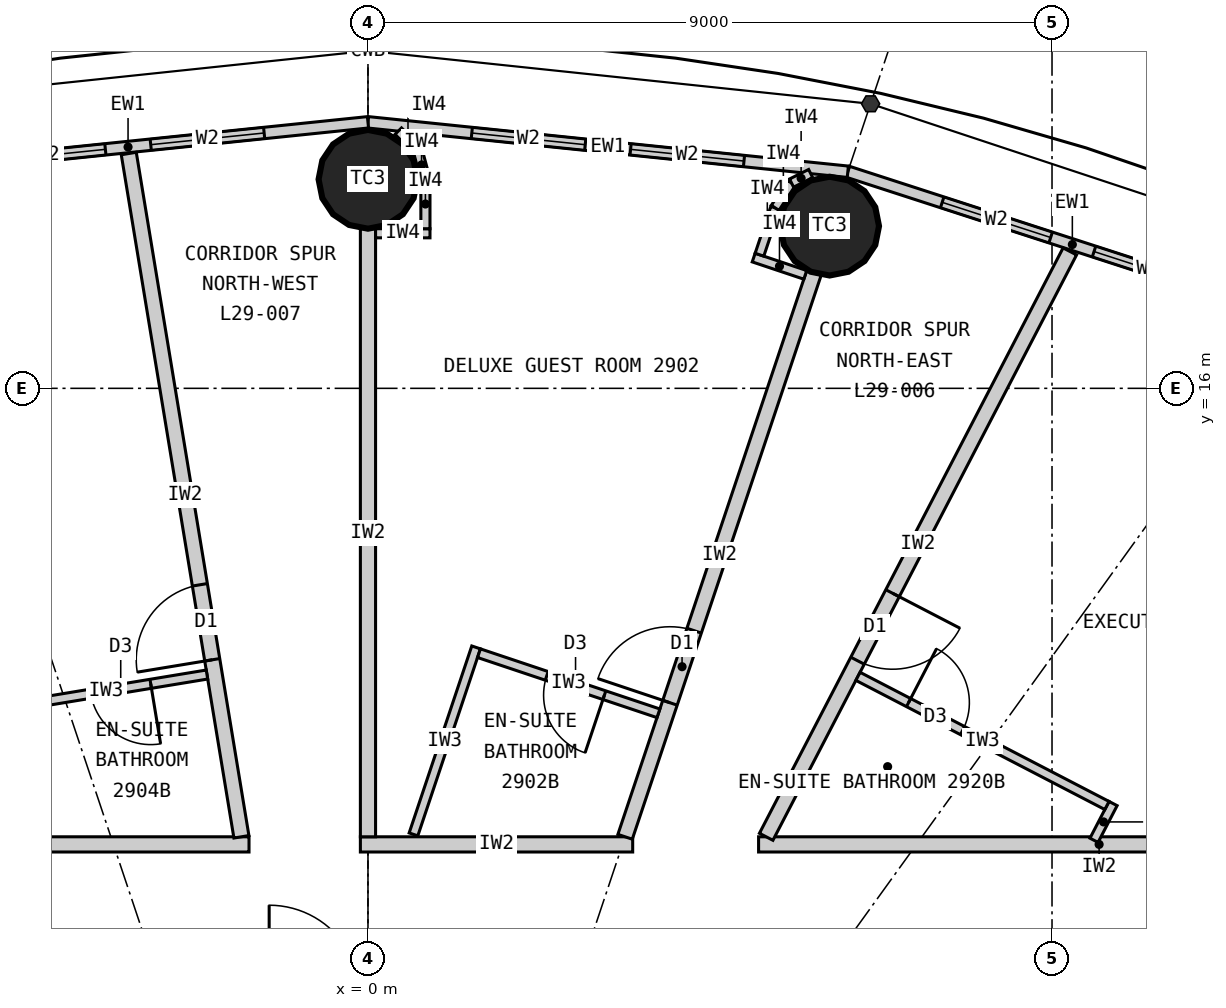
"""IFC4 building model, lengths in metres.
Left out: names, types, materials, properties, quantities, classifications, styles, units other than length and angle.
Written with IfcOpenShell. Run it as: python <this file> out.ifc"""

import sys

from ifc_helpers import new_model, si_unit, direction, frame, frame_2d, origin, origin_2d, place, context, subcontext, project, spatial, rectangle, circle, extrude, element, fill, save


model = new_model("IFC4")
c1 = context("Model", 3, precision=1e-05, world=origin(), true_north=direction((0.0, 1.0)))
c2 = subcontext(c1, "Body", "Model", "MODEL_VIEW")
j1 = project(units=[si_unit("LENGTHUNIT", "METRE"), si_unit("PLANEANGLEUNIT", "RADIAN")], contexts=[c1])
p1 = place(None, origin())
s1 = spatial("IfcSite", under=j1, at=p1, CompositionType="ELEMENT")
p2 = place(p1, origin())
s2 = spatial("IfcBuilding", under=s1, at=p2, CompositionType="ELEMENT")
p3 = place(p2, frame((0.0, 0.0, 115.5)))
s3 = spatial("IfcBuildingStorey", under=s2, at=p3, CompositionType="ELEMENT", Elevation=115.5)
for number, where, z_axis, x_axis in (
    (1, (6.074, 18.135, 0.0), (0.0, 0.0, 1.0), (1.0, 0.0, 0.0)),
    (2, (0.0, 18.75, 0.0), (0.0, 0.0, 1.0), (1.0, 0.0, 0.0)),
):
    element("IfcColumn", number, at=place(p3, frame(where, z_axis=z_axis, x_axis=x_axis)), inside=s3, PredefinedType="COLUMN", context=c2, shape_type="SweptSolid", body=[
        extrude(circle(Radius=0.65, at=origin_2d()), origin(), (0.0, 0.0, 1.0), 3.3),
    ])
p4 = place(p3, frame((12.221, 16.935, 0.0), z_axis=(0.0, 0.0, 1.0), x_axis=(-0.951272691506, 0.308350881944, 0.0)))
e3 = element("IfcWall", 3, at=p4, inside=s3, PredefinedType="ELEMENTEDWALL", context=c2, shape_type="SweptSolid", body=[
    extrude(rectangle(XDim=6.211, YDim=0.15, at=frame_2d((3.105, 0.0))), origin(), (0.0, 0.0, 1.0), 3.12),
])
p5 = place(p4, frame((1.305, 0.0, 0.9)))
e4 = element("IfcOpeningElement", 4, at=p5, cuts=e3, PredefinedType="OPENING", context=c2, shape_type="SweptSolid", body=[
    extrude(rectangle(XDim=1.5, YDim=1.9, at=frame_2d((0.75, 0.95))), frame((0.0, 0.085, 0.0), z_axis=(0.0, -1.0, 0.0), x_axis=(1.0, 0.0, 0.0)), (0.0, 0.0, 1.0), 0.17),
])
p6 = place(p4, frame((3.405, 0.0, 0.9)))
e5 = element("IfcOpeningElement", 5, at=p6, cuts=e3, PredefinedType="OPENING", context=c2, shape_type="SweptSolid", body=[
    extrude(rectangle(XDim=1.5, YDim=1.9, at=frame_2d((0.75, 0.95))), frame((0.0, 0.085, 0.0), z_axis=(0.0, -1.0, 0.0), x_axis=(1.0, 0.0, 0.0)), (0.0, 0.0, 1.0), 0.17),
])
p7 = place(p3, frame((6.313, 18.85, 0.0), z_axis=(0.0, 0.0, 1.0), x_axis=(-0.994735690163, 0.102473931887, 0.0)))
e6 = element("IfcWall", 6, at=p7, inside=s3, PredefinedType="ELEMENTEDWALL", context=c2, shape_type="SweptSolid", body=[
    extrude(rectangle(XDim=6.347, YDim=0.15, at=frame_2d((3.173, 0.0))), origin(), (0.0, 0.0, 1.0), 3.12),
])
p8 = place(p7, frame((1.373, 0.0, 0.9)))
e7 = element("IfcOpeningElement", 7, at=p8, cuts=e6, PredefinedType="OPENING", context=c2, shape_type="SweptSolid", body=[
    extrude(rectangle(XDim=1.5, YDim=1.9, at=frame_2d((0.75, 0.95))), frame((0.0, 0.085, 0.0), z_axis=(0.0, -1.0, 0.0), x_axis=(1.0, 0.0, 0.0)), (0.0, 0.0, 1.0), 0.17),
])
p9 = place(p7, frame((3.473, 0.0, 0.9)))
e8 = element("IfcOpeningElement", 8, at=p9, cuts=e6, PredefinedType="OPENING", context=c2, shape_type="SweptSolid", body=[
    extrude(rectangle(XDim=1.5, YDim=1.9, at=frame_2d((0.75, 0.95))), frame((0.0, 0.085, 0.0), z_axis=(0.0, -1.0, 0.0), x_axis=(1.0, 0.0, 0.0)), (0.0, 0.0, 1.0), 0.17),
])
p10 = place(p3, frame((0.0, 19.5, 0.0), z_axis=(0.0, 0.0, 1.0), x_axis=(-0.994735690163, -0.102473931887, 0.0)))
e9 = element("IfcWall", 9, at=p10, inside=s3, PredefinedType="ELEMENTEDWALL", context=c2, shape_type="SweptSolid", body=[
    extrude(rectangle(XDim=6.347, YDim=0.15, at=frame_2d((3.173, 0.0))), origin(), (0.0, 0.0, 1.0), 3.12),
])
p11 = place(p10, frame((1.373, 0.0, 0.9)))
e10 = element("IfcOpeningElement", 10, at=p11, cuts=e9, PredefinedType="OPENING", context=c2, shape_type="SweptSolid", body=[
    extrude(rectangle(XDim=1.5, YDim=1.9, at=frame_2d((0.75, 0.95))), frame((0.0, 0.085, 0.0), z_axis=(0.0, -1.0, 0.0), x_axis=(1.0, 0.0, 0.0)), (0.0, 0.0, 1.0), 0.17),
])
p12 = place(p10, frame((3.473, 0.0, 0.9)))
e11 = element("IfcOpeningElement", 11, at=p12, cuts=e9, PredefinedType="OPENING", context=c2, shape_type="SweptSolid", body=[
    extrude(rectangle(XDim=1.5, YDim=1.9, at=frame_2d((0.75, 0.95))), frame((0.0, 0.085, 0.0), z_axis=(0.0, -1.0, 0.0), x_axis=(1.0, 0.0, 0.0)), (0.0, 0.0, 1.0), 0.17),
])
p13 = place(p3, frame((-14.1, 10.0, 0.0), z_axis=(0.0, 0.0, 1.0), x_axis=(1.0, 0.0, 0.0)))
e12 = element("IfcWall", 12, at=p13, inside=s3, PredefinedType="PARTITIONING", context=c2, shape_type="SweptSolid", body=[
    extrude(rectangle(XDim=12.535, YDim=0.2, at=frame_2d((6.268, 0.0))), origin(), (0.0, 0.0, 1.0), 3.12),
])
p14 = place(p13, frame((2.801, 0.0, 0.0)))
e13 = element("IfcOpeningElement", 13, at=p14, cuts=e12, PredefinedType="OPENING", context=c2, shape_type="SweptSolid", body=[
    extrude(rectangle(XDim=1.0, YDim=2.2, at=frame_2d((0.5, 1.1))), frame((0.0, 0.11, 0.0), z_axis=(0.0, -1.0, 0.0), x_axis=(1.0, 0.0, 0.0)), (0.0, 0.0, 1.0), 0.22),
])
p15 = place(p3, frame((-0.1, 10.0, 0.0), z_axis=(0.0, 0.0, 1.0), x_axis=(1.0, 0.0, 0.0)))
e14 = element("IfcWall", 14, at=p15, inside=s3, PredefinedType="PARTITIONING", context=c2, shape_type="SweptSolid", body=[
    extrude(rectangle(XDim=3.583, YDim=0.2, at=frame_2d((1.792, 0.0))), origin(), (0.0, 0.0, 1.0), 3.12),
])
p16 = place(p3, frame((5.139, 10.0, 0.0), z_axis=(0.0, 0.0, 1.0), x_axis=(1.0, 0.0, 0.0)))
e15 = element("IfcWall", 15, at=p16, inside=s3, PredefinedType="PARTITIONING", context=c2, shape_type="SweptSolid", body=[
    extrude(rectangle(XDim=8.961, YDim=0.2, at=frame_2d((4.48, 0.0))), origin(), (0.0, 0.0, 1.0), 3.12),
])
p17 = place(p3, frame((5.239, 10.1, 0.0), z_axis=(0.0, 0.0, 1.0), x_axis=(0.4604797896, 0.887670188398, 0.0)))
e16 = element("IfcWall", 16, at=p17, inside=s3, PredefinedType="PARTITIONING", context=c2, shape_type="SweptSolid", body=[
    extrude(rectangle(XDim=8.676, YDim=0.2, at=frame_2d((4.338, 0.0))), origin(), (0.0, 0.0, 1.0), 3.12),
])
p18 = place(p17, frame((2.61, 0.0, 0.0)))
e17 = element("IfcOpeningElement", 17, at=p18, cuts=e16, PredefinedType="OPENING", context=c2, shape_type="SweptSolid", body=[
    extrude(rectangle(XDim=1.0, YDim=2.2, at=frame_2d((0.5, 1.1))), frame((0.0, 0.11, 0.0), z_axis=(0.0, -1.0, 0.0), x_axis=(1.0, 0.0, 0.0)), (0.0, 0.0, 1.0), 0.22),
])
p19 = place(p3, frame((3.383, 10.1, 0.0), z_axis=(0.0, 0.0, 1.0), x_axis=(0.317603705574, 0.948223542318, 0.0)))
e18 = element("IfcWall", 18, at=p19, inside=s3, PredefinedType="PARTITIONING", context=c2, shape_type="SweptSolid", body=[
    extrude(rectangle(XDim=7.823, YDim=0.2, at=frame_2d((3.912, 0.0))), origin(), (0.0, 0.0, 1.0), 2.37),
])
p20 = place(p19, frame((1.86, 0.0, 0.0)))
e19 = element("IfcOpeningElement", 19, at=p20, cuts=e18, PredefinedType="OPENING", context=c2, shape_type="SweptSolid", body=[
    extrude(rectangle(XDim=1.0, YDim=2.2, at=frame_2d((0.5, 1.1))), frame((0.0, 0.11, 0.0), z_axis=(0.0, -1.0, 0.0), x_axis=(1.0, 0.0, 0.0)), (0.0, 0.0, 1.0), 0.22),
])
p21 = place(p3, frame((0.0, 10.1, 0.0), z_axis=(0.0, 0.0, 1.0), x_axis=(0.0, 1.0, 0.0)))
e20 = element("IfcWall", 20, at=p21, inside=s3, PredefinedType="PARTITIONING", context=c2, shape_type="SweptSolid", body=[
    extrude(rectangle(XDim=8.0, YDim=0.2, at=frame_2d((4.0, 0.0))), origin(), (0.0, 0.0, 1.0), 2.37),
])
p22 = place(p3, frame((-1.665, 10.1, 0.0), z_axis=(0.0, 0.0, 1.0), x_axis=(-0.162660519103, 0.986682094459, 0.0)))
e21 = element("IfcWall", 21, at=p22, inside=s3, PredefinedType="PARTITIONING", context=c2, shape_type="SweptSolid", body=[
    extrude(rectangle(XDim=9.111, YDim=0.2, at=frame_2d((4.555, 0.0))), origin(), (0.0, 0.0, 1.0), 3.12),
])
p23 = place(p22, frame((2.36, 0.0, 0.0)))
e22 = element("IfcOpeningElement", 22, at=p23, cuts=e21, PredefinedType="OPENING", context=c2, shape_type="SweptSolid", body=[
    extrude(rectangle(XDim=1.0, YDim=2.2, at=frame_2d((0.5, 1.1))), frame((0.0, 0.11, 0.0), z_axis=(0.0, -1.0, 0.0), x_axis=(1.0, 0.0, 0.0)), (0.0, 0.0, 1.0), 0.22),
])
p24 = place(p3, frame((0.599, 10.132, 0.0), z_axis=(0.0, 0.0, 1.0), x_axis=(0.317554522053, 0.948240014724, 0.0)))
e23 = element("IfcWall", 23, at=p24, inside=s3, PredefinedType="PARTITIONING", context=c2, shape_type="SweptSolid", body=[
    extrude(rectangle(XDim=2.594, YDim=0.12, at=frame_2d((1.297, 0.0))), origin(), (0.0, 0.0, 1.0), 3.12),
])
p25 = place(p3, frame((3.822, 11.725, 0.0), z_axis=(0.0, 0.0, 1.0), x_axis=(-0.948231307998, 0.317580519761, 0.0)))
e24 = element("IfcWall", 24, at=p25, inside=s3, PredefinedType="PARTITIONING", context=c2, shape_type="SweptSolid", body=[
    extrude(rectangle(XDim=2.49, YDim=0.12, at=frame_2d((1.245, 0.0))), origin(), (0.0, 0.0, 1.0), 3.12),
])
p26 = place(p25, frame((0.75, 0.0, 0.0)))
e25 = element("IfcOpeningElement", 25, at=p26, cuts=e24, PredefinedType="OPENING", context=c2, shape_type="SweptSolid", body=[
    extrude(rectangle(XDim=0.8, YDim=2.1, at=frame_2d((0.4, 1.05))), frame((0.0, 0.07, 0.0), z_axis=(0.0, -1.0, 0.0), x_axis=(1.0, 0.0, 0.0)), (0.0, 0.0, 1.0), 0.14),
])
p27 = place(p3, frame((-2.118, 12.235, 0.0), z_axis=(0.0, 0.0, 1.0), x_axis=(-0.986686682911, -0.16263268357, 0.0)))
e26 = element("IfcWall", 26, at=p27, inside=s3, PredefinedType="PARTITIONING", context=c2, shape_type="SweptSolid", body=[
    extrude(rectangle(XDim=2.69, YDim=0.12, at=frame_2d((1.345, 0.0))), origin(), (0.0, 0.0, 1.0), 3.12),
])
p28 = place(p27, frame((0.75, 0.0, 0.0)))
e27 = element("IfcOpeningElement", 27, at=p28, cuts=e26, PredefinedType="OPENING", context=c2, shape_type="SweptSolid", body=[
    extrude(rectangle(XDim=0.8, YDim=2.1, at=frame_2d((0.4, 1.05))), frame((0.0, 0.07, 0.0), z_axis=(0.0, -1.0, 0.0), x_axis=(1.0, 0.0, 0.0)), (0.0, 0.0, 1.0), 0.14),
])
p29 = place(p3, frame((9.552, 10.054, 0.0), z_axis=(0.0, 0.0, 1.0), x_axis=(0.460604866949, 0.887605293215, 0.0)))
e28 = element("IfcWall", 28, at=p29, inside=s3, PredefinedType="PARTITIONING", context=c2, shape_type="SweptSolid", body=[
    extrude(rectangle(XDim=0.545, YDim=0.12, at=frame_2d((0.272, 0.0))), origin(), (0.0, 0.0, 1.0), 3.12),
])
p30 = place(p3, frame((6.447, 12.211, 0.0), z_axis=(0.0, 0.0, 1.0), x_axis=(0.887685422499, -0.460450421525, 0.0)))
e29 = element("IfcWall", 29, at=p30, inside=s3, PredefinedType="PARTITIONING", context=c2, shape_type="SweptSolid", body=[
    extrude(rectangle(XDim=3.69, YDim=0.12, at=frame_2d((1.845, 0.0))), origin(), (0.0, 0.0, 1.0), 3.12),
])
p31 = place(p30, frame((0.75, 0.0, 0.0)))
e30 = element("IfcOpeningElement", 30, at=p31, cuts=e29, PredefinedType="OPENING", context=c2, shape_type="SweptSolid", body=[
    extrude(rectangle(XDim=0.8, YDim=2.1, at=frame_2d((0.4, 1.05))), frame((0.0, 0.07, 0.0), z_axis=(0.0, -1.0, 0.0), x_axis=(1.0, 0.0, 0.0)), (0.0, 0.0, 1.0), 0.14),
])
p32 = place(p3, frame((5.754, 17.493, 0.0), z_axis=(0.0, 0.0, 1.0), x_axis=(-0.9482389443, 0.317557718397, 0.0)))
e31 = element("IfcWall", 31, at=p32, inside=s3, PredefinedType="PARTITIONING", context=c2, shape_type="SweptSolid", body=[
    extrude(rectangle(XDim=0.716, YDim=0.12, at=frame_2d((0.358, 0.0))), origin(), (0.0, 0.0, 1.0), 3.12),
])
p33 = place(p3, frame((5.151, 17.758, 0.0), z_axis=(0.0, 0.0, 1.0), x_axis=(0.317354244456, 0.948307061835, 0.0)))
e32 = element("IfcWall", 32, at=p33, inside=s3, PredefinedType="PARTITIONING", context=c2, shape_type="SweptSolid", body=[
    extrude(rectangle(XDim=0.65, YDim=0.12, at=frame_2d((0.325, 0.0))), origin(), (0.0, 0.0, 1.0), 3.12),
])
p34 = place(p3, frame((5.357, 18.375, 0.0), z_axis=(0.0, 0.0, 1.0), x_axis=(0.552249752128, 0.833678721856, 0.0)))
e33 = element("IfcWall", 33, at=p34, inside=s3, PredefinedType="PARTITIONING", context=c2, shape_type="SweptSolid", body=[
    extrude(rectangle(XDim=0.391, YDim=0.12, at=frame_2d((0.196, 0.0))), origin(), (0.0, 0.0, 1.0), 3.12),
])
p35 = place(p3, frame((5.573, 18.701, 0.0), z_axis=(0.0, 0.0, 1.0), x_axis=(0.895295561985, 0.445472621707, 0.0)))
e34 = element("IfcWall", 34, at=p35, inside=s3, PredefinedType="PARTITIONING", context=c2, shape_type="SweptSolid", body=[
    extrude(rectangle(XDim=0.281, YDim=0.12, at=frame_2d((0.14, 0.0))), origin(), (0.0, 0.0, 1.0), 3.12),
])
p36 = place(p3, frame((0.1, 18.04, 0.0), z_axis=(0.0, 0.0, 1.0), x_axis=(1.0, 0.0, 0.0)))
e35 = element("IfcWall", 35, at=p36, inside=s3, PredefinedType="PARTITIONING", context=c2, shape_type="SweptSolid", body=[
    extrude(rectangle(XDim=0.716, YDim=0.12, at=frame_2d((0.358, 0.0))), origin(), (0.0, 0.0, 1.0), 3.12),
])
p37 = place(p3, frame((0.756, 18.1, 0.0), z_axis=(0.0, 0.0, 1.0), x_axis=(0.0, 1.0, 0.0)))
e36 = element("IfcWall", 36, at=p37, inside=s3, PredefinedType="PARTITIONING", context=c2, shape_type="SweptSolid", body=[
    extrude(rectangle(XDim=0.65, YDim=0.12, at=frame_2d((0.325, 0.0))), origin(), (0.0, 0.0, 1.0), 3.12),
])
p38 = place(p3, frame((0.756, 18.75, 0.0), z_axis=(0.0, 0.0, 1.0), x_axis=(-0.2589440045, 0.965892334856, 0.0)))
e37 = element("IfcWall", 37, at=p38, inside=s3, PredefinedType="PARTITIONING", context=c2, shape_type="SweptSolid", body=[
    extrude(rectangle(XDim=0.391, YDim=0.12, at=frame_2d((0.196, 0.0))), origin(), (0.0, 0.0, 1.0), 3.12),
])
p39 = place(p3, frame((0.655, 19.128, 0.0), z_axis=(0.0, 0.0, 1.0), x_axis=(-0.707443899976, 0.706769501596, 0.0)))
e38 = element("IfcWall", 38, at=p39, inside=s3, PredefinedType="PARTITIONING", context=c2, shape_type="SweptSolid", body=[
    extrude(rectangle(XDim=0.362, YDim=0.12, at=frame_2d((0.181, 0.0))), origin(), (0.0, 0.0, 1.0), 3.12),
])
p40 = place(p5, origin())
e39 = element("IfcWindow", 39, at=p40, inside=s3, PartitioningType="SINGLE_PANEL", PredefinedType="WINDOW", context=c2, shape_type="SweptSolid", body=[
    extrude(rectangle(XDim=1.5, YDim=1.9, at=frame_2d((0.75, 0.95))), frame((0.0, 0.03, 0.0), z_axis=(0.0, -1.0, 0.0), x_axis=(1.0, 0.0, 0.0)), (0.0, 0.0, 1.0), 0.06),
])
fill(e4, e39)
p41 = place(p6, origin())
e40 = element("IfcWindow", 40, at=p41, inside=s3, PartitioningType="SINGLE_PANEL", PredefinedType="WINDOW", context=c2, shape_type="SweptSolid", body=[
    extrude(rectangle(XDim=1.5, YDim=1.9, at=frame_2d((0.75, 0.95))), frame((0.0, 0.03, 0.0), z_axis=(0.0, -1.0, 0.0), x_axis=(1.0, 0.0, 0.0)), (0.0, 0.0, 1.0), 0.06),
])
fill(e5, e40)
p42 = place(p8, origin())
e41 = element("IfcWindow", 41, at=p42, inside=s3, PartitioningType="SINGLE_PANEL", PredefinedType="WINDOW", context=c2, shape_type="SweptSolid", body=[
    extrude(rectangle(XDim=1.5, YDim=1.9, at=frame_2d((0.75, 0.95))), frame((0.0, 0.03, 0.0), z_axis=(0.0, -1.0, 0.0), x_axis=(1.0, 0.0, 0.0)), (0.0, 0.0, 1.0), 0.06),
])
fill(e7, e41)
p43 = place(p9, origin())
e42 = element("IfcWindow", 42, at=p43, inside=s3, PartitioningType="SINGLE_PANEL", PredefinedType="WINDOW", context=c2, shape_type="SweptSolid", body=[
    extrude(rectangle(XDim=1.5, YDim=1.9, at=frame_2d((0.75, 0.95))), frame((0.0, 0.03, 0.0), z_axis=(0.0, -1.0, 0.0), x_axis=(1.0, 0.0, 0.0)), (0.0, 0.0, 1.0), 0.06),
])
fill(e8, e42)
p44 = place(p11, origin())
e43 = element("IfcWindow", 43, at=p44, inside=s3, PartitioningType="SINGLE_PANEL", PredefinedType="WINDOW", context=c2, shape_type="SweptSolid", body=[
    extrude(rectangle(XDim=1.5, YDim=1.9, at=frame_2d((0.75, 0.95))), frame((0.0, 0.03, 0.0), z_axis=(0.0, -1.0, 0.0), x_axis=(1.0, 0.0, 0.0)), (0.0, 0.0, 1.0), 0.06),
])
fill(e10, e43)
p45 = place(p12, origin())
e44 = element("IfcWindow", 44, at=p45, inside=s3, PartitioningType="SINGLE_PANEL", PredefinedType="WINDOW", context=c2, shape_type="SweptSolid", body=[
    extrude(rectangle(XDim=1.5, YDim=1.9, at=frame_2d((0.75, 0.95))), frame((0.0, 0.03, 0.0), z_axis=(0.0, -1.0, 0.0), x_axis=(1.0, 0.0, 0.0)), (0.0, 0.0, 1.0), 0.06),
])
fill(e11, e44)
p46 = place(p26, origin())
e45 = element("IfcDoor", 45, at=p46, inside=s3, OperationType="SINGLE_SWING_LEFT", PredefinedType="DOOR", context=c2, shape_type="SweptSolid", body=[
    extrude(rectangle(XDim=0.8, YDim=2.1, at=frame_2d((0.4, 1.05))), frame((0.0, 0.025, 0.0), z_axis=(0.0, -1.0, 0.0), x_axis=(1.0, 0.0, 0.0)), (0.0, 0.0, 1.0), 0.05),
])
fill(e25, e45)
p47 = place(p20, origin())
e46 = element("IfcDoor", 46, at=p47, inside=s3, OperationType="SINGLE_SWING_LEFT", PredefinedType="DOOR", context=c2, shape_type="SweptSolid", body=[
    extrude(rectangle(XDim=1.0, YDim=2.2, at=frame_2d((0.5, 1.1))), frame((0.0, 0.025, 0.0), z_axis=(0.0, -1.0, 0.0), x_axis=(1.0, 0.0, 0.0)), (0.0, 0.0, 1.0), 0.05),
])
fill(e19, e46)
p48 = place(p28, origin())
e47 = element("IfcDoor", 47, at=p48, inside=s3, OperationType="SINGLE_SWING_LEFT", PredefinedType="DOOR", context=c2, shape_type="SweptSolid", body=[
    extrude(rectangle(XDim=0.8, YDim=2.1, at=frame_2d((0.4, 1.05))), frame((0.0, 0.025, 0.0), z_axis=(0.0, -1.0, 0.0), x_axis=(1.0, 0.0, 0.0)), (0.0, 0.0, 1.0), 0.05),
])
fill(e27, e47)
p49 = place(p23, origin())
e48 = element("IfcDoor", 48, at=p49, inside=s3, OperationType="SINGLE_SWING_LEFT", PredefinedType="DOOR", context=c2, shape_type="SweptSolid", body=[
    extrude(rectangle(XDim=1.0, YDim=2.2, at=frame_2d((0.5, 1.1))), frame((0.0, 0.025, 0.0), z_axis=(0.0, -1.0, 0.0), x_axis=(1.0, 0.0, 0.0)), (0.0, 0.0, 1.0), 0.05),
])
fill(e22, e48)
p50 = place(p31, origin())
e49 = element("IfcDoor", 49, at=p50, inside=s3, OperationType="SINGLE_SWING_LEFT", PredefinedType="DOOR", context=c2, shape_type="SweptSolid", body=[
    extrude(rectangle(XDim=0.8, YDim=2.1, at=frame_2d((0.4, 1.05))), frame((0.0, 0.025, 0.0), z_axis=(0.0, -1.0, 0.0), x_axis=(1.0, 0.0, 0.0)), (0.0, 0.0, 1.0), 0.05),
])
fill(e30, e49)
p51 = place(p18, origin())
e50 = element("IfcDoor", 50, at=p51, inside=s3, OperationType="SINGLE_SWING_RIGHT", PredefinedType="DOOR", context=c2, shape_type="SweptSolid", body=[
    extrude(rectangle(XDim=1.0, YDim=2.2, at=frame_2d((0.5, 1.1))), frame((0.0, 0.025, 0.0), z_axis=(0.0, -1.0, 0.0), x_axis=(1.0, 0.0, 0.0)), (0.0, 0.0, 1.0), 0.05),
])
fill(e17, e50)
save(model, sys.argv[1])
